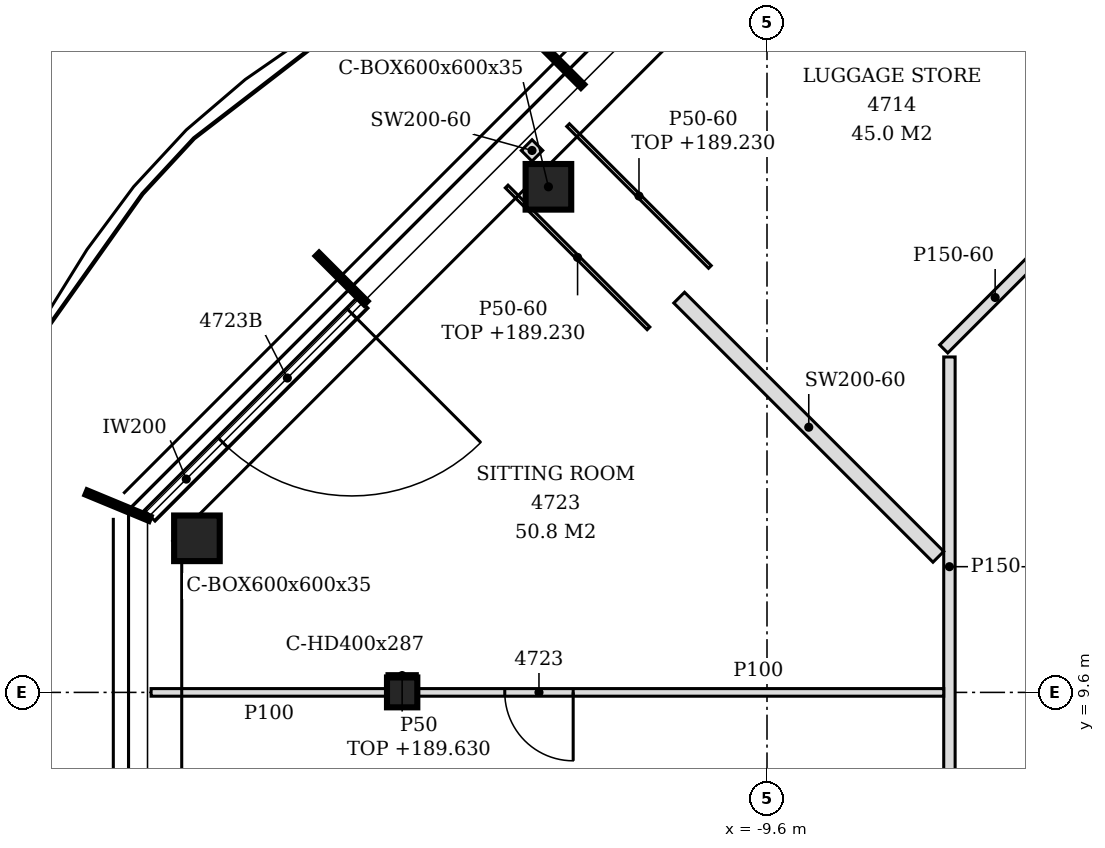
"""IFC4 building model, lengths in metres.
Left out: names, types, materials, properties, quantities, classifications, styles, units other than length and angle.
Written with IfcOpenShell. Run it as: python <this file> out.ifc"""

import sys

from ifc_helpers import new_model, si_unit, direction, frame, frame_2d, origin, origin_2d, place, context, subcontext, project, spatial, polyline, rectangle, hollow_rectangle, i_section, outline, extrude, clip, halfspace, element, fill, save


model = new_model("IFC4")
c1 = context("Model", 3, precision=1e-05, world=origin(), true_north=direction((0.0, 1.0)))
c2 = subcontext(c1, "Body", "Model", "MODEL_VIEW")
j1 = project(units=[si_unit("LENGTHUNIT", "METRE"), si_unit("PLANEANGLEUNIT", "RADIAN")], contexts=[c1])
p1 = place(None, origin())
s1 = spatial("IfcSite", under=j1, at=p1, CompositionType="ELEMENT")
p2 = place(p1, origin())
s2 = spatial("IfcBuilding", under=s1, at=p2, CompositionType="ELEMENT")
p3 = place(p2, frame((0.0, 0.0, 186.6)))
s3 = spatial("IfcBuildingStorey", under=s2, at=p3, CompositionType="ELEMENT", Elevation=186.6)
p4 = place(p3, frame((-12.476, 16.251, -0.15), z_axis=(0.387212850535, -0.258161908255, 0.885109392961), x_axis=(0.554729959787, 0.832030451194, 0.0)))
e1 = element("IfcColumn", 1, at=p4, inside=s3, PredefinedType="COLUMN", context=c2, shape_type="Clipping", body=[
    clip(extrude(hollow_rectangle(XDim=0.6, YDim=0.6, WallThickness=0.035, at=origin_2d()), origin(), (0.0, 0.0, 1.0), 4.067), halfspace(frame((0.0, 0.0, 4.049), z_axis=(0.0, 0.0, 1.0), x_axis=(1.0, 0.0, 0.0)), False)),
])
p5 = place(p3, frame((-17.1, 11.627, -0.15), z_axis=(0.38726387287, -0.258155907814, 0.885088820419), x_axis=(0.554670435147, 0.832070134288, 0.0)))
e2 = element("IfcColumn", 2, at=p5, inside=s3, PredefinedType="COLUMN", context=c2, shape_type="Clipping", body=[
    clip(extrude(hollow_rectangle(XDim=0.6, YDim=0.6, WallThickness=0.035, at=origin_2d()), origin(), (0.0, 0.0, 1.0), 4.067), halfspace(frame((0.0, 0.0, 4.049), z_axis=(0.0, 0.0, 1.0), x_axis=(1.0, 0.0, 0.0)), False)),
])
p6 = place(p3, frame((-14.4, 9.6, -0.15), z_axis=(0.0, 0.0, 1.0), x_axis=(1.0, 0.0, 0.0)))
e3 = element("IfcColumn", 3, at=p6, inside=s3, PredefinedType="COLUMN", context=c2, shape_type="SweptSolid", body=[
    extrude(i_section(OverallWidth=0.399, OverallDepth=0.393, WebThickness=0.023, FlangeThickness=0.037, FilletRadius=0.015, at=origin_2d()), origin(), (0.0, 0.0, 1.0), 3.6),
])
p7 = place(p3, frame((-14.92, 14.726, 0.0), z_axis=(0.0, 0.0, 1.0), x_axis=(-0.707137595296, -0.707075965734, 0.0)))
e4 = element("IfcWall", 4, at=p7, inside=s3, PredefinedType="NOTDEFINED", context=c2, shape_type="SweptSolid", body=[
    extrude(rectangle(XDim=3.961, YDim=0.2, at=frame_2d((1.981, 0.0))), origin(), (0.0, 0.0, 1.0), 3.45),
])
p8 = place(p7, frame((0.2, 0.0, 0.0)))
e5 = element("IfcOpeningElement", 5, at=p8, cuts=e4, PredefinedType="OPENING", context=c2, shape_type="SweptSolid", body=[
    extrude(rectangle(XDim=2.4, YDim=2.4, at=frame_2d((1.2, 1.2))), frame((0.0, 0.11, 0.0), z_axis=(0.0, -1.0, 0.0), x_axis=(1.0, 0.0, 0.0)), (0.0, 0.0, 1.0), 0.22),
])
p9 = place(p3, frame((-7.2, -9.5, 0.0), z_axis=(0.0, 0.0, 1.0), x_axis=(0.0, 1.0, 0.0)))
e6 = element("IfcWall", 6, at=p9, inside=s3, PredefinedType="PARTITIONING", context=c2, shape_type="SweptSolid", body=[
    extrude(outline(polyline([(0.0, 0.0), (23.513, 0.0), (23.513, 3.45), (20.55, 3.45), (20.548, 2.93), (20.35, 2.93), (20.348, 3.45), (15.75, 3.45), (15.748, 2.93), (15.55, 2.93), (15.548, 3.45), (10.95, 3.45), (10.948, 2.93), (10.75, 2.93), (10.748, 3.45), (6.15, 3.45), (6.148, 2.93), (5.95, 2.93), (5.948, 3.45), (1.35, 3.45), (1.348, 2.93), (1.15, 2.93), (1.148, 3.45), (0.0, 3.45), (0.0, 0.0)])), frame((0.0, 0.075, 0.0), z_axis=(0.0, -1.0, 0.0), x_axis=(1.0, 0.0, 0.0)), (0.0, 0.0, 1.0), 0.15),
])
p10 = place(p9, frame((17.095, 0.0, 0.0)))
e7 = element("IfcOpeningElement", 7, at=p10, cuts=e6, PredefinedType="OPENING", context=c2, shape_type="SweptSolid", body=[
    extrude(rectangle(XDim=0.9, YDim=2.1, at=frame_2d((0.45, 1.05))), frame((0.0, 0.085, 0.0), z_axis=(0.0, -1.0, 0.0), x_axis=(1.0, 0.0, 0.0)), (0.0, 0.0, 1.0), 0.17),
])
p11 = place(p9, frame((13.494, 0.0, 0.0)))
e8 = element("IfcOpeningElement", 8, at=p11, cuts=e6, PredefinedType="OPENING", context=c2, shape_type="SweptSolid", body=[
    extrude(rectangle(XDim=0.9, YDim=2.1, at=frame_2d((0.45, 1.05))), frame((0.0, 0.085, 0.0), z_axis=(0.0, -1.0, 0.0), x_axis=(1.0, 0.0, 0.0)), (0.0, 0.0, 1.0), 0.17),
])
p12 = place(p9, frame((7.68, 0.0, 0.0)))
e9 = element("IfcOpeningElement", 9, at=p12, cuts=e6, PredefinedType="OPENING", context=c2, shape_type="SweptSolid", body=[
    extrude(rectangle(XDim=0.9, YDim=2.1, at=frame_2d((0.45, 1.05))), frame((0.0, 0.085, 0.0), z_axis=(0.0, -1.0, 0.0), x_axis=(1.0, 0.0, 0.0)), (0.0, 0.0, 1.0), 0.17),
])
p13 = place(p9, frame((5.137, 0.0, 0.0)))
e10 = element("IfcOpeningElement", 10, at=p13, cuts=e6, PredefinedType="OPENING", context=c2, shape_type="SweptSolid", body=[
    extrude(rectangle(XDim=0.9, YDim=2.1, at=frame_2d((0.45, 1.05))), frame((0.0, 0.085, 0.0), z_axis=(0.0, -1.0, 0.0), x_axis=(1.0, 0.0, 0.0)), (0.0, 0.0, 1.0), 0.17),
])
p14 = place(p3, frame((-17.703, 9.6, 0.0), z_axis=(0.0, 0.0, 1.0), x_axis=(1.0, 0.0, 0.0)))
e11 = element("IfcWall", 11, at=p14, inside=s3, PredefinedType="PARTITIONING", context=c2, shape_type="SweptSolid", body=[
    extrude(outline(polyline([(0.0, 0.0), (3.103, 0.0), (3.104, 3.45), (2.528, 3.45), (2.526, 2.63), (1.828, 2.63), (1.826, 3.45), (0.0, 3.45), (0.0, 0.0)])), frame((0.0, 0.05, 0.0), z_axis=(0.0, -1.0, 0.0), x_axis=(1.0, 0.0, 0.0)), (0.0, 0.0, 1.0), 0.1),
])
p15 = place(p3, frame((-14.2, 9.6, 0.0), z_axis=(0.0, 0.0, 1.0), x_axis=(1.0, 0.0, 0.0)))
e12 = element("IfcWall", 12, at=p15, inside=s3, PredefinedType="PARTITIONING", context=c2, shape_type="SweptSolid", body=[
    extrude(rectangle(XDim=6.926, YDim=0.1, at=frame_2d((3.463, 0.0))), origin(), (0.0, 0.0, 1.0), 3.45),
])
p16 = place(p15, frame((1.15, 0.0, 0.0)))
e13 = element("IfcOpeningElement", 13, at=p16, cuts=e12, PredefinedType="OPENING", context=c2, shape_type="SweptSolid", body=[
    extrude(rectangle(XDim=0.9, YDim=2.1, at=frame_2d((0.45, 1.05))), frame((0.0, 0.06, 0.0), z_axis=(0.0, -1.0, 0.0), x_axis=(1.0, 0.0, 0.0)), (0.0, 0.0, 1.0), 0.12),
])
p17 = place(p3, frame((-7.346, 11.384, 0.0), z_axis=(0.0, 0.0, 1.0), x_axis=(-0.707132095121, 0.707081466346, 0.0)))
e14 = element("IfcWall", 14, at=p17, inside=s3, PredefinedType="PARTITIONING", context=c2, shape_type="SweptSolid", body=[
    extrude(rectangle(XDim=4.822, YDim=0.2, at=frame_2d((2.411, 0.0))), origin(), (0.0, 0.0, 1.0), 3.45),
])
p18 = place(p3, frame((-7.275, 14.119, 0.0), z_axis=(0.0, 0.0, 1.0), x_axis=(0.707042977282, 0.707170579335, 0.0)))
e15 = element("IfcWall", 15, at=p18, inside=s3, PredefinedType="PARTITIONING", context=c2, shape_type="SweptSolid", body=[
    extrude(rectangle(XDim=1.913, YDim=0.15, at=frame_2d((0.957, 0.0))), origin(), (0.0, 0.0, 1.0), 3.45),
])
p19 = place(p3, frame((-12.621, 16.659, 0.0), z_axis=(0.0, 0.0, 1.0), x_axis=(-0.707106781187, 0.707106781187, 0.0)))
e16 = element("IfcWall", 16, at=p19, inside=s3, PredefinedType="PARTITIONING", context=c2, shape_type="SweptSolid", body=[
    extrude(rectangle(XDim=0.199, YDim=0.2, at=frame_2d((0.1, 0.0))), origin(), (0.0, 0.0, 1.0), 3.45),
])
p20 = place(p3, frame((-4.01, 17.297, 0.0), z_axis=(0.0, 0.0, 1.0), x_axis=(-0.707188174772, 0.707025378231, 0.0)))
e17 = element("IfcWall", 17, at=p20, inside=s3, PredefinedType="PARTITIONING", context=c2, shape_type="SweptSolid", body=[
    extrude(rectangle(XDim=2.999, YDim=0.2, at=frame_2d((1.5, 0.0))), origin(), (0.0, 0.0, 1.0), 2.93),
])
p21 = place(p3, frame((-14.6, 9.822, 0.0), z_axis=(0.0, 0.0, 1.0), x_axis=(1.0, 0.0, 0.0)))
e18 = element("IfcWall", 18, at=p21, inside=s3, PredefinedType="PARTITIONING", context=c2, shape_type="SweptSolid", body=[
    extrude(rectangle(XDim=0.399, YDim=0.05, at=frame_2d((0.2, 0.0))), origin(), (0.0, 0.0, 1.0), 3.03),
])
for number, where, z_axis, x_axis in (
    (19, (-11.159, 14.39, 0.0), (0.0, 0.0, 1.0), (-0.707, 0.707, 0.0)),
    (20, (-10.351, 15.198, 0.0), (0.0, 0.0, 1.0), (-0.707, 0.707, 0.0)),
):
    element("IfcWall", number, at=place(p3, frame(where, z_axis=z_axis, x_axis=x_axis)), inside=s3, PredefinedType="PARTITIONING", context=c2, shape_type="SweptSolid", body=[
        extrude(rectangle(XDim=2.638, YDim=0.05, at=frame_2d((1.319, 0.0))), origin(), (0.0, 0.0, 1.0), 2.63),
    ])
p22 = place(p8, origin())
e21 = element("IfcDoor", 21, at=p22, inside=s3, OperationType="SINGLE_SWING_LEFT", PredefinedType="DOOR", context=c2, shape_type="SweptSolid", body=[
    extrude(rectangle(XDim=2.4, YDim=2.4, at=frame_2d((1.2, 1.2))), frame((0.0, 0.025, 0.0), z_axis=(0.0, -1.0, 0.0), x_axis=(1.0, 0.0, 0.0)), (0.0, 0.0, 1.0), 0.05),
])
fill(e5, e21)
p23 = place(p16, frame((0.9, 0.0, 0.0), z_axis=(0.0, 0.0, 1.0), x_axis=(-1.0, 0.0, 0.0)))
e22 = element("IfcDoor", 22, at=p23, inside=s3, OperationType="SINGLE_SWING_LEFT", PredefinedType="DOOR", context=c2, shape_type="SweptSolid", body=[
    extrude(rectangle(XDim=0.9, YDim=2.1, at=frame_2d((0.45, 1.05))), frame((0.0, 0.025, 0.0), z_axis=(0.0, -1.0, 0.0), x_axis=(1.0, 0.0, 0.0)), (0.0, 0.0, 1.0), 0.05),
])
fill(e13, e22)
save(model, sys.argv[1])
